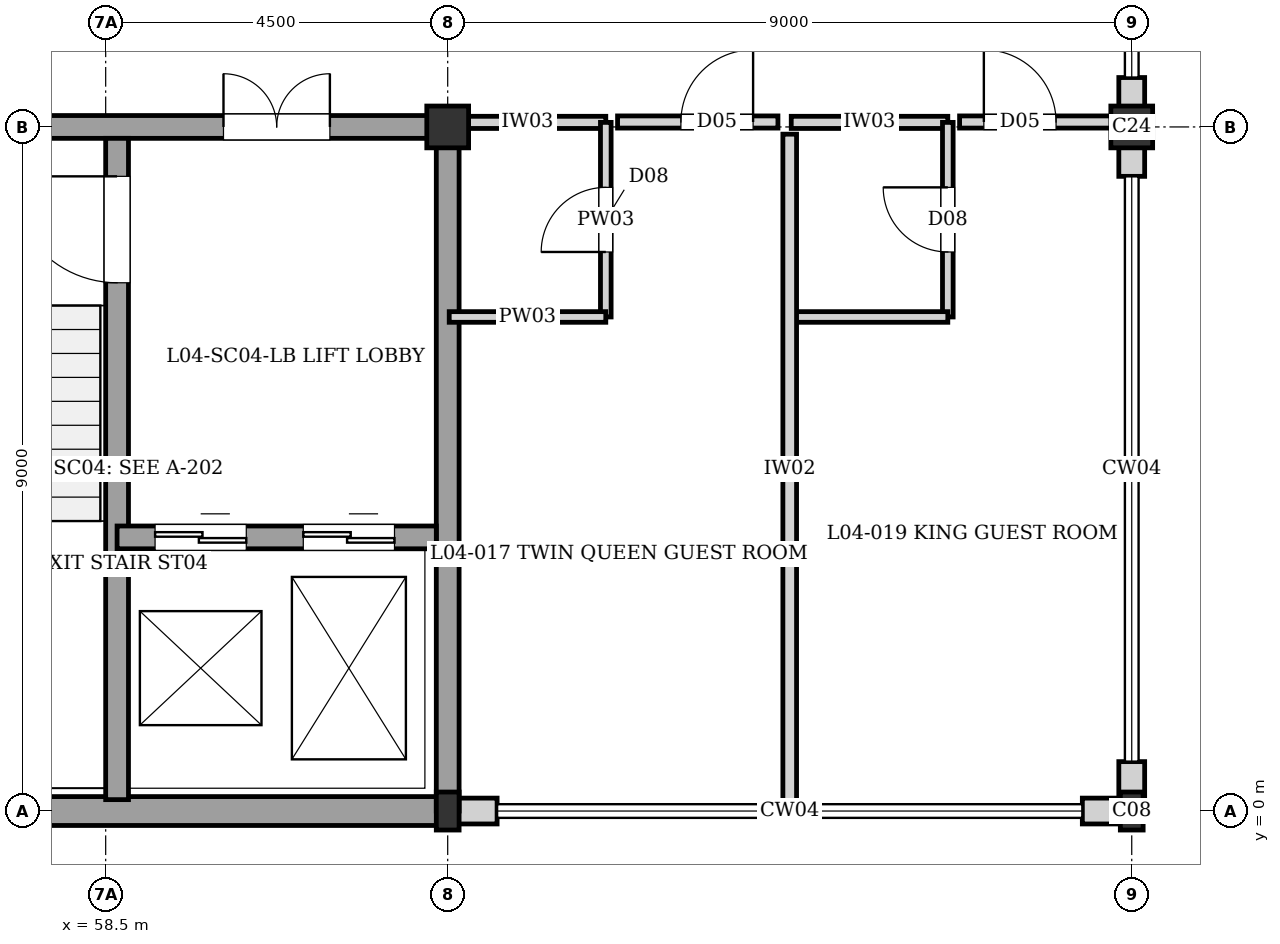
"""IFC4 building model, lengths in metres.
Left out: names, types, materials, properties, quantities, classifications, styles, units other than length and angle.
Written with IfcOpenShell. Run it as: python <this file> out.ifc"""

import sys

from ifc_helpers import new_model, si_unit, direction, frame, frame_2d, origin, origin_2d, place, context, subcontext, project, spatial, rectangle, i_section, extrude, element, fill, save


model = new_model("IFC4")
c1 = context("Model", 3, precision=1e-05, world=origin(), true_north=direction((0.0, 1.0)))
c2 = subcontext(c1, "Body", "Model", "MODEL_VIEW")
j1 = project(units=[si_unit("LENGTHUNIT", "METRE"), si_unit("PLANEANGLEUNIT", "RADIAN")], contexts=[c1])
p1 = place(None, origin())
s1 = spatial("IfcSite", under=j1, at=p1, CompositionType="ELEMENT")
p2 = place(p1, origin())
s2 = spatial("IfcBuilding", under=s1, at=p2, CompositionType="ELEMENT")
p3 = place(p2, frame((0.0, 0.0, 14.56)))
s3 = spatial("IfcBuildingStorey", under=s2, at=p3, CompositionType="ELEMENT", Elevation=14.56)
p4 = place(p3, frame((63.0, 0.0, 0.0), z_axis=(0.0, 0.0, 1.0), x_axis=(1.0, 0.0, 0.0)))
e1 = element("IfcColumn", 1, at=p4, inside=s3, PredefinedType="COLUMN", context=c2, shape_type="SweptSolid", body=[
    extrude(i_section(OverallWidth=0.3, OverallDepth=0.5, WebThickness=0.014, FlangeThickness=0.028, at=origin_2d()), origin(), (0.0, 0.0, 1.0), 3.04),
])
p5 = place(p3, frame((63.0, 9.0, 0.0), z_axis=(0.0, 0.0, 1.0), x_axis=(1.0, 0.0, 0.0)))
e2 = element("IfcColumn", 2, at=p5, inside=s3, PredefinedType="COLUMN", context=c2, shape_type="SweptSolid", body=[
    extrude(rectangle(XDim=0.55, YDim=0.55, at=origin_2d()), origin(), (0.0, 0.0, 1.0), 3.04),
])
p6 = place(p3, frame((72.0, 0.0, 0.0), z_axis=(0.0, 0.0, 1.0), x_axis=(1.0, 0.0, 0.0)))
e3 = element("IfcColumn", 3, at=p6, inside=s3, PredefinedType="COLUMN", context=c2, shape_type="SweptSolid", body=[
    extrude(i_section(OverallWidth=0.3, OverallDepth=0.5, WebThickness=0.014, FlangeThickness=0.028, at=origin_2d()), origin(), (0.0, 0.0, 1.0), 3.04),
])
p7 = place(p3, frame((72.0, 9.0, 0.0), z_axis=(0.0, 0.0, 1.0), x_axis=(1.0, 0.0, 0.0)))
e4 = element("IfcColumn", 4, at=p7, inside=s3, PredefinedType="COLUMN", context=c2, shape_type="SweptSolid", body=[
    extrude(rectangle(XDim=0.55, YDim=0.55, at=origin_2d()), origin(), (0.0, 0.0, 1.0), 3.04),
])
p8 = place(p3, frame((72.0, 9.65, 0.0), z_axis=(0.0, 0.0, 1.0), x_axis=(0.0, -1.0, 0.0)))
e5 = element("IfcWall", 5, at=p8, inside=s3, PredefinedType="SOLIDWALL", context=c2, shape_type="SweptSolid", body=[
    extrude(rectangle(XDim=0.65, YDim=0.34, at=frame_2d((0.325, 0.0))), origin(), (0.0, 0.0, 1.0), 2.82),
])
p9 = place(p3, frame((72.0, 9.0, 0.0), z_axis=(0.0, 0.0, 1.0), x_axis=(0.0, -1.0, 0.0)))
e6 = element("IfcWall", 6, at=p9, inside=s3, PredefinedType="SOLIDWALL", context=c2, shape_type="SweptSolid", body=[
    extrude(rectangle(XDim=0.65, YDim=0.34, at=frame_2d((0.325, 0.0))), origin(), (0.0, 0.0, 1.0), 2.38),
])
p10 = place(p3, frame((72.0, 0.65, 0.0), z_axis=(0.0, 0.0, 1.0), x_axis=(0.0, -1.0, 0.0)))
e7 = element("IfcWall", 7, at=p10, inside=s3, PredefinedType="SOLIDWALL", context=c2, shape_type="SweptSolid", body=[
    extrude(rectangle(XDim=0.495, YDim=0.34, at=frame_2d((0.248, 0.0))), origin(), (0.0, 0.0, 1.0), 2.82),
])
p11 = place(p3, frame((72.0, 0.0, 0.0), z_axis=(0.0, 0.0, 1.0), x_axis=(-1.0, 0.0, 0.0)))
e8 = element("IfcWall", 8, at=p11, inside=s3, PredefinedType="SOLIDWALL", context=c2, shape_type="SweptSolid", body=[
    extrude(rectangle(XDim=0.65, YDim=0.34, at=frame_2d((0.325, 0.0))), origin(), (0.0, 0.0, 1.0), 2.48),
])
p12 = place(p3, frame((63.65, 0.0, 0.0), z_axis=(0.0, 0.0, 1.0), x_axis=(-1.0, 0.0, 0.0)))
e9 = element("IfcWall", 9, at=p12, inside=s3, PredefinedType="SOLIDWALL", context=c2, shape_type="SweptSolid", body=[
    extrude(rectangle(XDim=0.52, YDim=0.34, at=frame_2d((0.26, 0.0))), origin(), (0.0, 0.0, 1.0), 2.48),
])
p13 = place(p3, frame((63.0, 0.0, 0.0), z_axis=(0.0, 0.0, 1.0), x_axis=(-1.0, 0.0, 0.0)))
e10 = element("IfcWall", 10, at=p13, inside=s3, PredefinedType="SOLIDWALL", context=c2, shape_type="SweptSolid", body=[
    extrude(rectangle(XDim=9.0, YDim=0.38, at=frame_2d((4.5, 0.0))), origin(), (0.0, 0.0, 1.0), 2.82),
])
p14 = place(p3, frame((63.0, 0.0, 0.0), z_axis=(0.0, 0.0, 1.0), x_axis=(0.0, 1.0, 0.0)))
e11 = element("IfcWall", 11, at=p14, inside=s3, PredefinedType="SHEAR", context=c2, shape_type="SweptSolid", body=[
    extrude(rectangle(XDim=9.0, YDim=0.3, at=frame_2d((4.5, 0.0))), origin(), (0.0, 0.0, 1.0), 2.82),
])
p15 = place(p3, frame((54.0, 9.0, 0.0), z_axis=(0.0, 0.0, 1.0), x_axis=(1.0, 0.0, 0.0)))
e12 = element("IfcWall", 12, at=p15, inside=s3, PredefinedType="SHEAR", context=c2, shape_type="SweptSolid", body=[
    extrude(rectangle(XDim=9.0, YDim=0.3, at=frame_2d((4.5, 0.0))), origin(), (0.0, 0.0, 1.0), 2.82),
])
p16 = place(p15, frame((6.05, 0.0, 0.0)))
e13 = element("IfcOpeningElement", 13, at=p16, cuts=e12, PredefinedType="OPENING", context=c2, shape_type="SweptSolid", body=[
    extrude(rectangle(XDim=1.4, YDim=2.02, at=frame_2d((0.7, 1.01))), frame((0.0, 0.16, 0.0), z_axis=(0.0, -1.0, 0.0), x_axis=(1.0, 0.0, 0.0)), (0.0, 0.0, 1.0), 0.32),
])
p17 = place(p3, frame((58.65, 0.15, 0.0), z_axis=(0.0, 0.0, 1.0), x_axis=(0.0, 1.0, 0.0)))
e14 = element("IfcWall", 14, at=p17, inside=s3, PredefinedType="SHEAR", context=c2, shape_type="SweptSolid", body=[
    extrude(rectangle(XDim=8.7, YDim=0.3, at=frame_2d((4.35, 0.0))), origin(), (0.0, 0.0, 1.0), 2.82),
])
p18 = place(p17, frame((6.8, 0.0, 0.0)))
e15 = element("IfcOpeningElement", 15, at=p18, cuts=e14, PredefinedType="OPENING", context=c2, shape_type="SweptSolid", body=[
    extrude(rectangle(XDim=1.4, YDim=2.02, at=frame_2d((0.7, 1.01))), frame((0.0, 0.16, 0.0), z_axis=(0.0, -1.0, 0.0), x_axis=(1.0, 0.0, 0.0)), (0.0, 0.0, 1.0), 0.32),
])
p19 = place(p3, frame((58.65, 3.6, 0.0), z_axis=(0.0, 0.0, 1.0), x_axis=(1.0, 0.0, 0.0)))
e16 = element("IfcWall", 16, at=p19, inside=s3, PredefinedType="SHEAR", context=c2, shape_type="SweptSolid", body=[
    extrude(rectangle(XDim=4.2, YDim=0.3, at=frame_2d((2.1, 0.0))), origin(), (0.0, 0.0, 1.0), 2.82),
])
p20 = place(p19, frame((0.5, 0.0, 0.0)))
e17 = element("IfcOpeningElement", 17, at=p20, cuts=e16, PredefinedType="OPENING", context=c2, shape_type="SweptSolid", body=[
    extrude(rectangle(XDim=1.2, YDim=2.2, at=frame_2d((0.6, 1.1))), frame((0.0, 0.16, 0.0), z_axis=(0.0, -1.0, 0.0), x_axis=(1.0, 0.0, 0.0)), (0.0, 0.0, 1.0), 0.32),
])
p21 = place(p19, frame((2.45, 0.0, 0.0)))
e18 = element("IfcOpeningElement", 18, at=p21, cuts=e16, PredefinedType="OPENING", context=c2, shape_type="SweptSolid", body=[
    extrude(rectangle(XDim=1.2, YDim=2.2, at=frame_2d((0.6, 1.1))), frame((0.0, 0.16, 0.0), z_axis=(0.0, -1.0, 0.0), x_axis=(1.0, 0.0, 0.0)), (0.0, 0.0, 1.0), 0.32),
])
p22 = place(p3, frame((63.02, 9.06, 0.0), z_axis=(0.0, 0.0, 1.0), x_axis=(1.0, 0.0, 0.0)))
e19 = element("IfcWall", 19, at=p22, inside=s3, PredefinedType="PARTITIONING", context=c2, shape_type="SweptSolid", body=[
    extrude(rectangle(XDim=2.06, YDim=0.16, at=frame_2d((1.03, 0.0))), origin(), (0.0, 0.0, 1.0), 2.33),
])
p23 = place(p3, frame((65.08, 6.5, 0.0), z_axis=(0.0, 0.0, 1.0), x_axis=(0.0, 1.0, 0.0)))
e20 = element("IfcWall", 20, at=p23, inside=s3, PredefinedType="PLUMBINGWALL", context=c2, shape_type="SweptSolid", body=[
    extrude(rectangle(XDim=2.56, YDim=0.14, at=frame_2d((1.28, 0.0))), origin(), (0.0, 0.0, 1.0), 2.82),
])
p24 = place(p23, frame((0.855, 0.0, 0.0)))
e21 = element("IfcOpeningElement", 21, at=p24, cuts=e20, PredefinedType="OPENING", context=c2, shape_type="SweptSolid", body=[
    extrude(rectangle(XDim=0.85, YDim=2.04, at=frame_2d((0.425, 1.02))), frame((0.0, 0.08, 0.0), z_axis=(0.0, -1.0, 0.0), x_axis=(1.0, 0.0, 0.0)), (0.0, 0.0, 1.0), 0.16),
])
p25 = place(p3, frame((63.02, 6.5, 0.0), z_axis=(0.0, 0.0, 1.0), x_axis=(1.0, 0.0, 0.0)))
e22 = element("IfcWall", 22, at=p25, inside=s3, PredefinedType="PLUMBINGWALL", context=c2, shape_type="SweptSolid", body=[
    extrude(rectangle(XDim=2.06, YDim=0.14, at=frame_2d((1.03, 0.0))), origin(), (0.0, 0.0, 1.0), 2.82),
])
p26 = place(p3, frame((67.52, 9.06, 0.0), z_axis=(0.0, 0.0, 1.0), x_axis=(1.0, 0.0, 0.0)))
e23 = element("IfcWall", 23, at=p26, inside=s3, PredefinedType="PARTITIONING", context=c2, shape_type="SweptSolid", body=[
    extrude(rectangle(XDim=2.06, YDim=0.16, at=frame_2d((1.03, 0.0))), origin(), (0.0, 0.0, 1.0), 2.33),
])
p27 = place(p3, frame((69.58, 6.5, 0.0), z_axis=(0.0, 0.0, 1.0), x_axis=(0.0, 1.0, 0.0)))
e24 = element("IfcWall", 24, at=p27, inside=s3, PredefinedType="PLUMBINGWALL", context=c2, shape_type="SweptSolid", body=[
    extrude(rectangle(XDim=2.56, YDim=0.14, at=frame_2d((1.28, 0.0))), origin(), (0.0, 0.0, 1.0), 2.82),
])
p28 = place(p27, frame((0.855, 0.0, 0.0)))
e25 = element("IfcOpeningElement", 25, at=p28, cuts=e24, PredefinedType="OPENING", context=c2, shape_type="SweptSolid", body=[
    extrude(rectangle(XDim=0.85, YDim=2.04, at=frame_2d((0.425, 1.02))), frame((0.0, 0.08, 0.0), z_axis=(0.0, -1.0, 0.0), x_axis=(1.0, 0.0, 0.0)), (0.0, 0.0, 1.0), 0.16),
])
p29 = place(p3, frame((67.52, 6.5, 0.0), z_axis=(0.0, 0.0, 1.0), x_axis=(1.0, 0.0, 0.0)))
e26 = element("IfcWall", 26, at=p29, inside=s3, PredefinedType="PLUMBINGWALL", context=c2, shape_type="SweptSolid", body=[
    extrude(rectangle(XDim=2.06, YDim=0.14, at=frame_2d((1.03, 0.0))), origin(), (0.0, 0.0, 1.0), 2.82),
])
p30 = place(p3, frame((67.5, 0.095, 0.0), z_axis=(0.0, 0.0, 1.0), x_axis=(0.0, 1.0, 0.0)))
e27 = element("IfcWall", 27, at=p30, inside=s3, PredefinedType="PARTITIONING", context=c2, shape_type="SweptSolid", body=[
    extrude(rectangle(XDim=8.81, YDim=0.18, at=frame_2d((4.405, 0.0))), origin(), (0.0, 0.0, 1.0), 2.82),
])
p31 = place(p3, frame((65.235, 9.065, 0.0), z_axis=(0.0, 0.0, 1.0), x_axis=(1.0, 0.0, 0.0)))
e28 = element("IfcWall", 28, at=p31, inside=s3, PredefinedType="PARTITIONING", context=c2, shape_type="SweptSolid", body=[
    extrude(rectangle(XDim=2.11, YDim=0.16, at=frame_2d((1.055, 0.0))), origin(), (0.0, 0.0, 1.0), 2.33),
])
p32 = place(p31, frame((0.833, 0.0, 0.0)))
e29 = element("IfcOpeningElement", 29, at=p32, cuts=e28, PredefinedType="OPENING", context=c2, shape_type="SweptSolid", body=[
    extrude(rectangle(XDim=0.95, YDim=2.15, at=frame_2d((0.475, 1.075))), frame((0.0, 0.09, 0.0), z_axis=(0.0, -1.0, 0.0), x_axis=(1.0, 0.0, 0.0)), (0.0, 0.0, 1.0), 0.18),
])
p33 = place(p3, frame((69.735, 9.065, 0.0), z_axis=(0.0, 0.0, 1.0), x_axis=(1.0, 0.0, 0.0)))
e30 = element("IfcWall", 30, at=p33, inside=s3, PredefinedType="PARTITIONING", context=c2, shape_type="SweptSolid", body=[
    extrude(rectangle(XDim=2.09, YDim=0.16, at=frame_2d((1.045, 0.0))), origin(), (0.0, 0.0, 1.0), 2.33),
])
p34 = place(p33, frame((0.319, 0.0, 0.0)))
e31 = element("IfcOpeningElement", 31, at=p34, cuts=e30, PredefinedType="OPENING", context=c2, shape_type="SweptSolid", body=[
    extrude(rectangle(XDim=0.95, YDim=2.15, at=frame_2d((0.475, 1.075))), frame((0.0, 0.09, 0.0), z_axis=(0.0, -1.0, 0.0), x_axis=(1.0, 0.0, 0.0)), (0.0, 0.0, 1.0), 0.18),
])
p35 = place(p16, origin())
e32 = element("IfcDoor", 32, at=p35, inside=s3, OperationType="DOUBLE_DOOR_SINGLE_SWING", PredefinedType="DOOR", context=c2, shape_type="SweptSolid", body=[
    extrude(rectangle(XDim=1.4, YDim=2.02, at=frame_2d((0.7, 1.01))), frame((0.0, 0.025, 0.0), z_axis=(0.0, -1.0, 0.0), x_axis=(1.0, 0.0, 0.0)), (0.0, 0.0, 1.0), 0.05),
])
fill(e13, e32)
p36 = place(p18, origin())
e33 = element("IfcDoor", 33, at=p36, inside=s3, OperationType="SINGLE_SWING_RIGHT", PredefinedType="DOOR", context=c2, shape_type="SweptSolid", body=[
    extrude(rectangle(XDim=1.4, YDim=2.02, at=frame_2d((0.7, 1.01))), frame((0.0, 0.025, 0.0), z_axis=(0.0, -1.0, 0.0), x_axis=(1.0, 0.0, 0.0)), (0.0, 0.0, 1.0), 0.05),
])
fill(e15, e33)
p37 = place(p20, origin())
e34 = element("IfcDoor", 34, at=p37, inside=s3, OperationType="DOUBLE_DOOR_SLIDING", PredefinedType="DOOR", context=c2, shape_type="SweptSolid", body=[
    extrude(rectangle(XDim=1.2, YDim=2.2, at=frame_2d((0.6, 1.1))), frame((0.0, 0.025, 0.0), z_axis=(0.0, -1.0, 0.0), x_axis=(1.0, 0.0, 0.0)), (0.0, 0.0, 1.0), 0.05),
])
fill(e17, e34)
p38 = place(p21, origin())
e35 = element("IfcDoor", 35, at=p38, inside=s3, OperationType="DOUBLE_DOOR_SLIDING", PredefinedType="DOOR", context=c2, shape_type="SweptSolid", body=[
    extrude(rectangle(XDim=1.2, YDim=2.2, at=frame_2d((0.6, 1.1))), frame((0.0, 0.025, 0.0), z_axis=(0.0, -1.0, 0.0), x_axis=(1.0, 0.0, 0.0)), (0.0, 0.0, 1.0), 0.05),
])
fill(e18, e35)
p39 = place(p24, origin())
e36 = element("IfcDoor", 36, at=p39, inside=s3, OperationType="SINGLE_SWING_LEFT", PredefinedType="DOOR", context=c2, shape_type="SweptSolid", body=[
    extrude(rectangle(XDim=0.85, YDim=2.04, at=frame_2d((0.425, 1.02))), frame((0.0, 0.025, 0.0), z_axis=(0.0, -1.0, 0.0), x_axis=(1.0, 0.0, 0.0)), (0.0, 0.0, 1.0), 0.05),
])
fill(e21, e36)
p40 = place(p28, origin())
e37 = element("IfcDoor", 37, at=p40, inside=s3, OperationType="SINGLE_SWING_RIGHT", PredefinedType="DOOR", context=c2, shape_type="SweptSolid", body=[
    extrude(rectangle(XDim=0.85, YDim=2.04, at=frame_2d((0.425, 1.02))), frame((0.0, 0.025, 0.0), z_axis=(0.0, -1.0, 0.0), x_axis=(1.0, 0.0, 0.0)), (0.0, 0.0, 1.0), 0.05),
])
fill(e25, e37)
p41 = place(p32, origin())
e38 = element("IfcDoor", 38, at=p41, inside=s3, OperationType="SINGLE_SWING_RIGHT", PredefinedType="DOOR", context=c2, shape_type="SweptSolid", body=[
    extrude(rectangle(XDim=0.95, YDim=2.15, at=frame_2d((0.475, 1.075))), frame((0.0, 0.025, 0.0), z_axis=(0.0, -1.0, 0.0), x_axis=(1.0, 0.0, 0.0)), (0.0, 0.0, 1.0), 0.05),
])
fill(e29, e38)
p42 = place(p34, origin())
e39 = element("IfcDoor", 39, at=p42, inside=s3, OperationType="SINGLE_SWING_LEFT", PredefinedType="DOOR", context=c2, shape_type="SweptSolid", body=[
    extrude(rectangle(XDim=0.95, YDim=2.15, at=frame_2d((0.475, 1.075))), frame((0.0, 0.025, 0.0), z_axis=(0.0, -1.0, 0.0), x_axis=(1.0, 0.0, 0.0)), (0.0, 0.0, 1.0), 0.05),
])
fill(e31, e39)
save(model, sys.argv[1])
